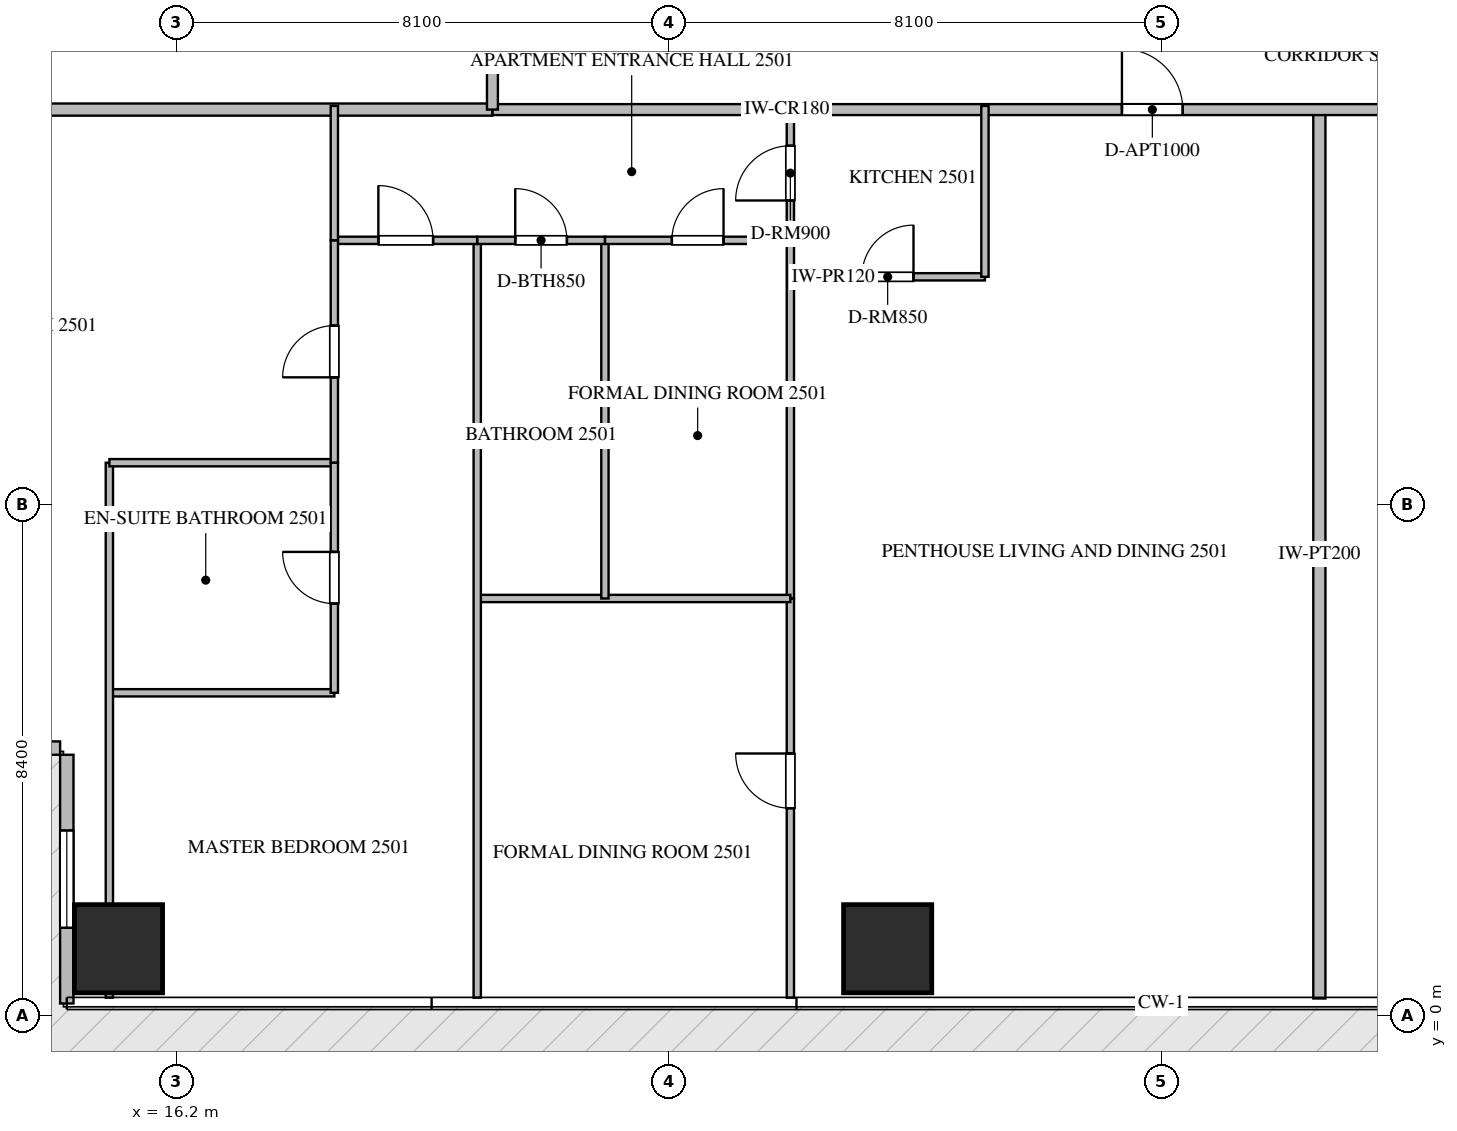
"""IFC4 building model, lengths in metres.
Left out: names, types, materials, properties, quantities, classifications, styles, units other than length and angle.
Written with IfcOpenShell. Run it as: python <this file> out.ifc"""

import sys

from ifc_helpers import new_model, si_unit, direction, frame, frame_2d, origin, origin_2d, place, context, subcontext, project, spatial, rectangle, extrude, source, transform, mapped, element, fill, save


model = new_model("IFC4")
c1 = context("Model", 3, precision=1e-05, world=origin(), true_north=direction((0.0, 1.0)))
c2 = subcontext(c1, "Body", "Model", "MODEL_VIEW")
j1 = project(units=[si_unit("LENGTHUNIT", "METRE"), si_unit("PLANEANGLEUNIT", "RADIAN")], contexts=[c1])
p1 = place(None, origin())
s1 = spatial("IfcSite", under=j1, at=p1, CompositionType="ELEMENT")
p2 = place(p1, origin())
s2 = spatial("IfcBuilding", under=s1, at=p2, CompositionType="ELEMENT")
p3 = place(p2, frame((0.0, 0.0, 101.7)))
s3 = spatial("IfcBuildingStorey", under=s2, at=p3, CompositionType="ELEMENT", Elevation=101.7)
m1 = source(origin(), c2, "Body", "SweptSolid", [
    extrude(rectangle(XDim=1.45, YDim=1.45, at=origin_2d()), origin(), (0.0, 0.0, 1.0), 3.75),
])
for number, where, z_axis, x_axis in (
    (1, (15.25, 1.1, -0.26), (0.0, 0.0, 1.0), (1.0, 0.0, 0.0)),
    (2, (27.9, 1.1, -0.26), (0.0, 0.0, 1.0), (1.0, 0.0, 0.0)),
):
    element("IfcColumn", number, at=place(p3, frame(where, z_axis=z_axis, x_axis=x_axis)), inside=s3, PredefinedType="COLUMN", context=c2, shape_type="MappedRepresentation", body=[
        mapped(m1, transform((0.0, 0.0, 0.0), scale=1.0)),
    ])
p4 = place(p3, frame((10.31, 4.4, 0.0), z_axis=(0.0, 0.0, 1.0), x_axis=(1.0, 0.0, 0.0)))
e3 = element("IfcWall", 3, at=p4, inside=s3, PredefinedType="ELEMENTEDWALL", context=c2, shape_type="SweptSolid", body=[
    extrude(rectangle(XDim=3.98, YDim=0.22, at=frame_2d((1.99, 0.0))), origin(), (0.0, 0.0, 1.0), 3.475),
])
p5 = place(p4, frame((1.19, 0.0, 0.65)))
e4 = element("IfcOpeningElement", 4, at=p5, cuts=e3, PredefinedType="OPENING", context=c2, shape_type="SweptSolid", body=[
    extrude(rectangle(XDim=1.6, YDim=2.1, at=frame_2d((0.8, 1.05))), frame((0.0, 0.12, 0.0), z_axis=(0.0, -1.0, 0.0), x_axis=(1.0, 0.0, 0.0)), (0.0, 0.0, 1.0), 0.24),
])
p6 = place(p3, frame((14.4, 4.29, 0.0), z_axis=(0.0, 0.0, 1.0), x_axis=(0.0, -1.0, 0.0)))
e5 = element("IfcWall", 5, at=p6, inside=s3, PredefinedType="ELEMENTEDWALL", context=c2, shape_type="SweptSolid", body=[
    extrude(rectangle(XDim=4.09, YDim=0.22, at=frame_2d((2.045, 0.0))), origin(), (0.0, 0.0, 1.0), 3.475),
])
p7 = place(p6, frame((1.245, 0.0, 0.65)))
e6 = element("IfcOpeningElement", 6, at=p7, cuts=e5, PredefinedType="OPENING", context=c2, shape_type="SweptSolid", body=[
    extrude(rectangle(XDim=1.6, YDim=2.1, at=frame_2d((0.8, 1.05))), frame((0.0, 0.12, 0.0), z_axis=(0.0, -1.0, 0.0), x_axis=(1.0, 0.0, 0.0)), (0.0, 0.0, 1.0), 0.24),
])
p8 = place(p3, frame((35.0, 0.282, 0.0), z_axis=(0.0, 0.0, 1.0), x_axis=(0.0, 1.0, 0.0)))
e7 = element("IfcWall", 7, at=p8, inside=s3, PredefinedType="PARTITIONING", context=c2, shape_type="SweptSolid", body=[
    extrude(rectangle(XDim=14.618, YDim=0.2, at=frame_2d((7.309, 0.0))), origin(), (0.0, 0.0, 1.0), 3.49),
])
p9 = place(p3, frame((6.082, 14.9, 0.0), z_axis=(0.0, 0.0, 1.0), x_axis=(1.0, 0.0, 0.0)))
e8 = element("IfcWall", 8, at=p9, inside=s3, PredefinedType="PARTITIONING", context=c2, shape_type="SweptSolid", body=[
    extrude(rectangle(XDim=15.318, YDim=0.2, at=frame_2d((7.659, 0.0))), origin(), (0.0, 0.0, 1.0), 3.49),
])
p10 = place(p3, frame((21.402, 14.9, 0.0), z_axis=(0.0, 0.0, 1.0), x_axis=(1.0, 0.0, 0.0)))
e9 = element("IfcWall", 9, at=p10, inside=s3, PredefinedType="PARTITIONING", context=c2, shape_type="SweptSolid", body=[
    extrude(rectangle(XDim=21.996, YDim=0.18, at=frame_2d((10.998, 0.0))), origin(), (0.0, 0.0, 1.0), 3.49),
])
p11 = place(p10, frame((10.351, 0.0, 0.0)))
e10 = element("IfcOpeningElement", 10, at=p11, cuts=e9, PredefinedType="OPENING", context=c2, shape_type="SweptSolid", body=[
    extrude(rectangle(XDim=1.0, YDim=2.15, at=frame_2d((0.5, 1.075))), frame((0.0, 0.1, 0.0), z_axis=(0.0, -1.0, 0.0), x_axis=(1.0, 0.0, 0.0)), (0.0, 0.0, 1.0), 0.2),
])
p12 = place(p10, frame((15.978, 0.0, 0.0)))
e11 = element("IfcOpeningElement", 11, at=p12, cuts=e9, PredefinedType="OPENING", context=c2, shape_type="SweptSolid", body=[
    extrude(rectangle(XDim=1.0, YDim=2.15, at=frame_2d((0.5, 1.075))), frame((0.0, 0.1, 0.0), z_axis=(0.0, -1.0, 0.0), x_axis=(1.0, 0.0, 0.0)), (0.0, 0.0, 1.0), 0.2),
])
p13 = place(p3, frame((21.4, 14.9, 0.0), z_axis=(0.0, 0.0, 1.0), x_axis=(0.0, 1.0, 0.0)))
e12 = element("IfcWall", 12, at=p13, inside=s3, PredefinedType="PARTITIONING", context=c2, shape_type="SweptSolid", body=[
    extrude(rectangle(XDim=20.6, YDim=0.18, at=frame_2d((10.3, 0.0))), origin(), (0.0, 0.0, 1.0), 3.49),
])
p14 = place(p13, frame((17.64, 0.0, 0.0)))
e13 = element("IfcOpeningElement", 13, at=p14, cuts=e12, PredefinedType="OPENING", context=c2, shape_type="SweptSolid", body=[
    extrude(rectangle(XDim=1.0, YDim=2.15, at=frame_2d((0.5, 1.075))), frame((0.0, 0.1, 0.0), z_axis=(0.0, -1.0, 0.0), x_axis=(1.0, 0.0, 0.0)), (0.0, 0.0, 1.0), 0.2),
])
p15 = place(p3, frame((26.3, 12.15, 0.0), z_axis=(0.0, 0.0, 1.0), x_axis=(1.0, 0.0, 0.0)))
e14 = element("IfcWall", 14, at=p15, inside=s3, PredefinedType="PARTITIONING", context=c2, shape_type="SweptSolid", body=[
    extrude(rectangle(XDim=3.2, YDim=0.12, at=frame_2d((1.6, 0.0))), origin(), (0.0, 0.0, 1.0), 3.49),
])
p16 = place(p15, frame((1.175, 0.0, 0.0)))
e15 = element("IfcOpeningElement", 15, at=p16, cuts=e14, PredefinedType="OPENING", context=c2, shape_type="SweptSolid", body=[
    extrude(rectangle(XDim=0.85, YDim=2.1, at=frame_2d((0.425, 1.05))), frame((0.0, 0.07, 0.0), z_axis=(0.0, -1.0, 0.0), x_axis=(1.0, 0.0, 0.0)), (0.0, 0.0, 1.0), 0.14),
])
p17 = place(p3, frame((29.5, 12.15, 0.0), z_axis=(0.0, 0.0, 1.0), x_axis=(0.0, 1.0, 0.0)))
e16 = element("IfcWall", 16, at=p17, inside=s3, PredefinedType="PARTITIONING", context=c2, shape_type="SweptSolid", body=[
    extrude(rectangle(XDim=2.81, YDim=0.12, at=frame_2d((1.405, 0.0))), origin(), (0.0, 0.0, 1.0), 3.49),
])
p18 = place(p3, frame((26.3, 12.75, 0.0), z_axis=(0.0, 0.0, 1.0), x_axis=(0.0, 1.0, 0.0)))
e17 = element("IfcWall", 17, at=p18, inside=s3, PredefinedType="PARTITIONING", context=c2, shape_type="SweptSolid", body=[
    extrude(rectangle(XDim=2.21, YDim=0.12, at=frame_2d((1.105, 0.0))), origin(), (0.0, 0.0, 1.0), 3.49),
])
p19 = place(p18, frame((0.655, 0.0, 0.0)))
e18 = element("IfcOpeningElement", 18, at=p19, cuts=e17, PredefinedType="OPENING", context=c2, shape_type="SweptSolid", body=[
    extrude(rectangle(XDim=0.9, YDim=2.1, at=frame_2d((0.45, 1.05))), frame((0.0, 0.07, 0.0), z_axis=(0.0, -1.0, 0.0), x_axis=(1.0, 0.0, 0.0)), (0.0, 0.0, 1.0), 0.14),
])
p20 = place(p3, frame((26.3, 0.295, 0.0), z_axis=(0.0, 0.0, 1.0), x_axis=(0.0, 1.0, 0.0)))
e19 = element("IfcWall", 19, at=p20, inside=s3, PredefinedType="PARTITIONING", context=c2, shape_type="SweptSolid", body=[
    extrude(rectangle(XDim=6.565, YDim=0.12, at=frame_2d((3.283, 0.0))), origin(), (0.0, 0.0, 1.0), 3.49),
])
p21 = place(p20, frame((3.116, 0.0, 0.0)))
e20 = element("IfcOpeningElement", 20, at=p21, cuts=e19, PredefinedType="OPENING", context=c2, shape_type="SweptSolid", body=[
    extrude(rectangle(XDim=0.9, YDim=2.1, at=frame_2d((0.45, 1.05))), frame((0.0, 0.07, 0.0), z_axis=(0.0, -1.0, 0.0), x_axis=(1.0, 0.0, 0.0)), (0.0, 0.0, 1.0), 0.14),
])
p22 = place(p3, frame((26.3, 6.862, 0.0), z_axis=(0.0, 0.0, 1.0), x_axis=(0.0, 1.0, 0.0)))
e21 = element("IfcWall", 21, at=p22, inside=s3, PredefinedType="PARTITIONING", context=c2, shape_type="SweptSolid", body=[
    extrude(rectangle(XDim=5.886, YDim=0.12, at=frame_2d((2.943, 0.0))), origin(), (0.0, 0.0, 1.0), 3.49),
])
p23 = place(p3, frame((21.15, 6.86, 0.0), z_axis=(0.0, 0.0, 1.0), x_axis=(1.0, 0.0, 0.0)))
e22 = element("IfcWall", 22, at=p23, inside=s3, PredefinedType="PARTITIONING", context=c2, shape_type="SweptSolid", body=[
    extrude(rectangle(XDim=5.15, YDim=0.12, at=frame_2d((2.575, 0.0))), origin(), (0.0, 0.0, 1.0), 3.49),
])
p24 = place(p3, frame((21.15, 0.295, 0.0), z_axis=(0.0, 0.0, 1.0), x_axis=(0.0, 1.0, 0.0)))
e23 = element("IfcWall", 23, at=p24, inside=s3, PredefinedType="PARTITIONING", context=c2, shape_type="SweptSolid", body=[
    extrude(rectangle(XDim=12.455, YDim=0.12, at=frame_2d((6.228, 0.0))), origin(), (0.0, 0.0, 1.0), 3.49),
])
p25 = place(p3, frame((23.25, 6.86, 0.0), z_axis=(0.0, 0.0, 1.0), x_axis=(0.0, 1.0, 0.0)))
e24 = element("IfcWall", 24, at=p25, inside=s3, PredefinedType="PARTITIONING", context=c2, shape_type="SweptSolid", body=[
    extrude(rectangle(XDim=5.89, YDim=0.12, at=frame_2d((2.945, 0.0))), origin(), (0.0, 0.0, 1.0), 3.49),
])
p26 = place(p3, frame((21.15, 12.75, 0.0), z_axis=(0.0, 0.0, 1.0), x_axis=(1.0, 0.0, 0.0)))
e25 = element("IfcWall", 25, at=p26, inside=s3, PredefinedType="PARTITIONING", context=c2, shape_type="SweptSolid", body=[
    extrude(rectangle(XDim=2.1, YDim=0.12, at=frame_2d((1.05, 0.0))), origin(), (0.0, 0.0, 1.0), 3.49),
])
p27 = place(p26, frame((0.625, 0.0, 0.0)))
e26 = element("IfcOpeningElement", 26, at=p27, cuts=e25, PredefinedType="OPENING", context=c2, shape_type="SweptSolid", body=[
    extrude(rectangle(XDim=0.85, YDim=2.1, at=frame_2d((0.425, 1.05))), frame((0.0, 0.07, 0.0), z_axis=(0.0, -1.0, 0.0), x_axis=(1.0, 0.0, 0.0)), (0.0, 0.0, 1.0), 0.14),
])
p28 = place(p3, frame((23.252, 12.75, 0.0), z_axis=(0.0, 0.0, 1.0), x_axis=(1.0, 0.0, 0.0)))
e27 = element("IfcWall", 27, at=p28, inside=s3, PredefinedType="PARTITIONING", context=c2, shape_type="SweptSolid", body=[
    extrude(rectangle(XDim=3.048, YDim=0.12, at=frame_2d((1.524, 0.0))), origin(), (0.0, 0.0, 1.0), 3.49),
])
p29 = place(p28, frame((1.099, 0.0, 0.0)))
e28 = element("IfcOpeningElement", 28, at=p29, cuts=e27, PredefinedType="OPENING", context=c2, shape_type="SweptSolid", body=[
    extrude(rectangle(XDim=0.85, YDim=2.1, at=frame_2d((0.425, 1.05))), frame((0.0, 0.07, 0.0), z_axis=(0.0, -1.0, 0.0), x_axis=(1.0, 0.0, 0.0)), (0.0, 0.0, 1.0), 0.14),
])
p30 = place(p3, frame((18.8, 12.75, 0.0), z_axis=(0.0, 0.0, 1.0), x_axis=(1.0, 0.0, 0.0)))
e29 = element("IfcWall", 29, at=p30, inside=s3, PredefinedType="PARTITIONING", context=c2, shape_type="SweptSolid", body=[
    extrude(rectangle(XDim=2.348, YDim=0.12, at=frame_2d((1.174, 0.0))), origin(), (0.0, 0.0, 1.0), 3.49),
])
p31 = place(p30, frame((0.724, 0.0, 0.0)))
e30 = element("IfcOpeningElement", 30, at=p31, cuts=e29, PredefinedType="OPENING", context=c2, shape_type="SweptSolid", body=[
    extrude(rectangle(XDim=0.9, YDim=2.1, at=frame_2d((0.45, 1.05))), frame((0.0, 0.07, 0.0), z_axis=(0.0, -1.0, 0.0), x_axis=(1.0, 0.0, 0.0)), (0.0, 0.0, 1.0), 0.14),
])
p32 = place(p3, frame((15.1, 5.309, 0.0), z_axis=(0.0, 0.0, 1.0), x_axis=(1.0, 0.0, 0.0)))
e31 = element("IfcWall", 31, at=p32, inside=s3, PredefinedType="PARTITIONING", context=c2, shape_type="SweptSolid", body=[
    extrude(rectangle(XDim=3.7, YDim=0.12, at=frame_2d((1.85, 0.0))), origin(), (0.0, 0.0, 1.0), 3.49),
])
p33 = place(p3, frame((15.1, 0.295, 0.0), z_axis=(0.0, 0.0, 1.0), x_axis=(0.0, 1.0, 0.0)))
e32 = element("IfcWall", 32, at=p33, inside=s3, PredefinedType="PARTITIONING", context=c2, shape_type="SweptSolid", body=[
    extrude(rectangle(XDim=8.798, YDim=0.12, at=frame_2d((4.399, 0.0))), origin(), (0.0, 0.0, 1.0), 2.922),
])
p34 = place(p3, frame((15.1, 9.093, 0.0), z_axis=(0.0, 0.0, 1.0), x_axis=(1.0, 0.0, 0.0)))
e33 = element("IfcWall", 33, at=p34, inside=s3, PredefinedType="PARTITIONING", context=c2, shape_type="SweptSolid", body=[
    extrude(rectangle(XDim=3.7, YDim=0.12, at=frame_2d((1.85, 0.0))), origin(), (0.0, 0.0, 1.0), 3.49),
])
p35 = place(p3, frame((18.8, 5.309, 0.0), z_axis=(0.0, 0.0, 1.0), x_axis=(0.0, 1.0, 0.0)))
e34 = element("IfcWall", 34, at=p35, inside=s3, PredefinedType="PARTITIONING", context=c2, shape_type="SweptSolid", body=[
    extrude(rectangle(XDim=3.784, YDim=0.12, at=frame_2d((1.892, 0.0))), origin(), (0.0, 0.0, 1.0), 3.49),
])
p36 = place(p35, frame((1.467, 0.0, 0.0)))
e35 = element("IfcOpeningElement", 35, at=p36, cuts=e34, PredefinedType="OPENING", context=c2, shape_type="SweptSolid", body=[
    extrude(rectangle(XDim=0.85, YDim=2.1, at=frame_2d((0.425, 1.05))), frame((0.0, 0.07, 0.0), z_axis=(0.0, -1.0, 0.0), x_axis=(1.0, 0.0, 0.0)), (0.0, 0.0, 1.0), 0.14),
])
p37 = place(p3, frame((18.8, 9.095, 0.0), z_axis=(0.0, 0.0, 1.0), x_axis=(0.0, 1.0, 0.0)))
e36 = element("IfcWall", 36, at=p37, inside=s3, PredefinedType="PARTITIONING", context=c2, shape_type="SweptSolid", body=[
    extrude(rectangle(XDim=3.655, YDim=0.12, at=frame_2d((1.828, 0.0))), origin(), (0.0, 0.0, 1.0), 3.49),
])
p38 = place(p37, frame((1.402, 0.0, 0.0)))
e37 = element("IfcOpeningElement", 37, at=p38, cuts=e36, PredefinedType="OPENING", context=c2, shape_type="SweptSolid", body=[
    extrude(rectangle(XDim=0.85, YDim=2.1, at=frame_2d((0.425, 1.05))), frame((0.0, 0.07, 0.0), z_axis=(0.0, -1.0, 0.0), x_axis=(1.0, 0.0, 0.0)), (0.0, 0.0, 1.0), 0.14),
])
p39 = place(p3, frame((18.8, 12.752, 0.0), z_axis=(0.0, 0.0, 1.0), x_axis=(0.0, 1.0, 0.0)))
e38 = element("IfcWall", 38, at=p39, inside=s3, PredefinedType="PARTITIONING", context=c2, shape_type="SweptSolid", body=[
    extrude(rectangle(XDim=2.208, YDim=0.12, at=frame_2d((1.104, 0.0))), origin(), (0.0, 0.0, 1.0), 3.49),
])
m2 = source(origin(), c2, "Body", "SweptSolid", [
    extrude(rectangle(XDim=1.6, YDim=2.1, at=frame_2d((0.8, 1.05))), frame((0.0, 0.03, 0.0), z_axis=(0.0, -1.0, 0.0), x_axis=(1.0, 0.0, 0.0)), (0.0, 0.0, 1.0), 0.06),
])
p40 = place(p7, origin())
e39 = element("IfcWindow", 39, at=p40, inside=s3, PartitioningType="SINGLE_PANEL", PredefinedType="WINDOW", context=c2, shape_type="MappedRepresentation", body=[
    mapped(m2, transform((0.0, 0.0, 0.0), scale=1.0)),
])
fill(e6, e39)
m3 = source(origin(), c2, "Body", "SweptSolid", [
    extrude(rectangle(XDim=1.0, YDim=2.15, at=frame_2d((0.5, 1.075))), frame((0.0, 0.025, 0.0), z_axis=(0.0, -1.0, 0.0), x_axis=(1.0, 0.0, 0.0)), (0.0, 0.0, 1.0), 0.05),
])
p41 = place(p11, origin())
e40 = element("IfcDoor", 40, at=p41, inside=s3, OperationType="SINGLE_SWING_LEFT", PredefinedType="DOOR", context=c2, shape_type="MappedRepresentation", body=[
    mapped(m3, transform((0.0, 0.0, 0.0), scale=1.0)),
])
fill(e10, e40)
m4 = source(origin(), c2, "Body", "SweptSolid", [
    extrude(rectangle(XDim=0.85, YDim=2.1, at=frame_2d((0.425, 1.05))), frame((0.0, 0.025, 0.0), z_axis=(0.0, -1.0, 0.0), x_axis=(1.0, 0.0, 0.0)), (0.0, 0.0, 1.0), 0.05),
])
p42 = place(p16, origin())
e41 = element("IfcDoor", 41, at=p42, inside=s3, OperationType="SINGLE_SWING_RIGHT", PredefinedType="DOOR", context=c2, shape_type="MappedRepresentation", body=[
    mapped(m4, transform((0.0, 0.0, 0.0), scale=1.0)),
])
fill(e15, e41)
m5 = source(origin(), c2, "Body", "SweptSolid", [
    extrude(rectangle(XDim=0.9, YDim=2.1, at=frame_2d((0.45, 1.05))), frame((0.0, 0.025, 0.0), z_axis=(0.0, -1.0, 0.0), x_axis=(1.0, 0.0, 0.0)), (0.0, 0.0, 1.0), 0.05),
])
p43 = place(p19, origin())
e42 = element("IfcDoor", 42, at=p43, inside=s3, OperationType="SINGLE_SWING_LEFT", PredefinedType="DOOR", context=c2, shape_type="MappedRepresentation", body=[
    mapped(m5, transform((0.0, 0.0, 0.0), scale=1.0)),
])
fill(e18, e42)
p44 = place(p21, origin())
e43 = element("IfcDoor", 43, at=p44, inside=s3, OperationType="SINGLE_SWING_RIGHT", PredefinedType="DOOR", context=c2, shape_type="MappedRepresentation", body=[
    mapped(m5, transform((0.0, 0.0, 0.0), scale=1.0)),
])
fill(e20, e43)
p45 = place(p27, origin())
e44 = element("IfcDoor", 44, at=p45, inside=s3, OperationType="SINGLE_SWING_LEFT", PredefinedType="DOOR", context=c2, shape_type="MappedRepresentation", body=[
    mapped(m4, transform((0.0, 0.0, 0.0), scale=1.0)),
])
fill(e26, e44)
p46 = place(p29, origin())
e45 = element("IfcDoor", 45, at=p46, inside=s3, OperationType="SINGLE_SWING_RIGHT", PredefinedType="DOOR", context=c2, shape_type="MappedRepresentation", body=[
    mapped(m4, transform((0.0, 0.0, 0.0), scale=1.0)),
])
fill(e28, e45)
p47 = place(p31, origin())
e46 = element("IfcDoor", 46, at=p47, inside=s3, OperationType="SINGLE_SWING_LEFT", PredefinedType="DOOR", context=c2, shape_type="MappedRepresentation", body=[
    mapped(m5, transform((0.0, 0.0, 0.0), scale=1.0)),
])
fill(e30, e46)
p48 = place(p36, origin())
e47 = element("IfcDoor", 47, at=p48, inside=s3, OperationType="SINGLE_SWING_RIGHT", PredefinedType="DOOR", context=c2, shape_type="MappedRepresentation", body=[
    mapped(m4, transform((0.0, 0.0, 0.0), scale=1.0)),
])
fill(e35, e47)
p49 = place(p38, origin())
e48 = element("IfcDoor", 48, at=p49, inside=s3, OperationType="SINGLE_SWING_LEFT", PredefinedType="DOOR", context=c2, shape_type="MappedRepresentation", body=[
    mapped(m4, transform((0.0, 0.0, 0.0), scale=1.0)),
])
fill(e37, e48)
save(model, sys.argv[1])
